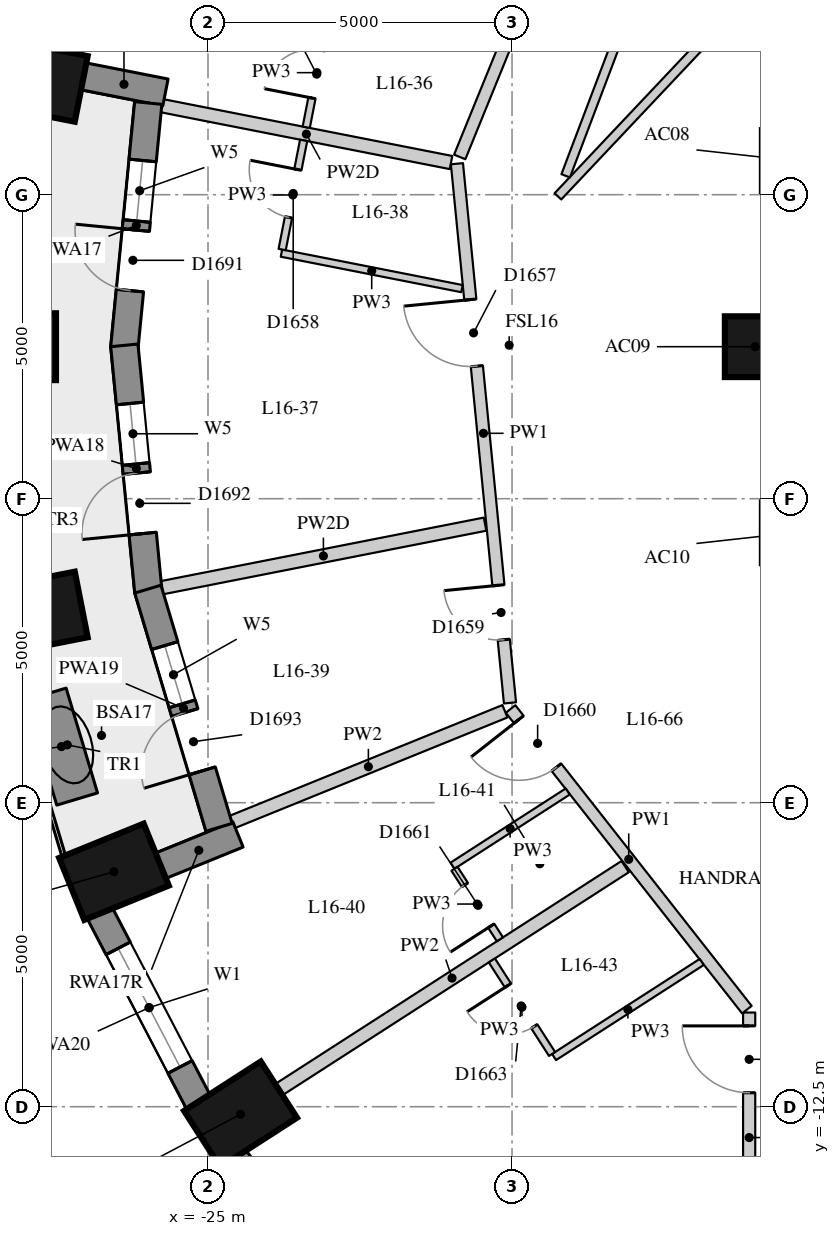
"""IFC4 building model, lengths in metres.
Left out: names, types, materials, properties, quantities, classifications, styles, units other than length and angle.
Written with IfcOpenShell. Run it as: python <this file> out.ifc"""

import sys

from ifc_helpers import new_model, si_unit, direction, frame, frame_2d, origin, origin_2d, place, context, subcontext, project, spatial, rectangle, extrude, element, fill, save


model = new_model("IFC4")
c1 = context("Model", 3, precision=1e-05, world=origin(), true_north=direction((0.0, 1.0)))
c2 = subcontext(c1, "Body", "Model", "MODEL_VIEW")
j1 = project(units=[si_unit("LENGTHUNIT", "METRE"), si_unit("PLANEANGLEUNIT", "RADIAN")], contexts=[c1])
p1 = place(None, origin())
s1 = spatial("IfcSite", under=j1, at=p1, CompositionType="ELEMENT")
p2 = place(p1, origin())
s2 = spatial("IfcBuilding", under=s1, at=p2, CompositionType="ELEMENT")
p3 = place(p2, frame((0.0, 0.0, 61.3)))
s3 = spatial("IfcBuildingStorey", under=s2, at=p3, CompositionType="ELEMENT", Elevation=61.3)
for number, where, z_axis, x_axis in (
    (1, (-27.821, 4.385, 0.0), (0.0, 0.0, 1.0), (-0.981, 0.193, 0.0)),
    (2, (-28.25, 0.0, 0.0), (0.0, 0.0, 1.0), (-1.0, 0.0, 0.0)),
    (3, (-27.821, -4.385, 0.0), (0.0, 0.0, 1.0), (-0.981, -0.193, 0.0)),
    (4, (-26.546, -8.636, 0.0), (0.0, 0.0, 1.0), (-0.927, -0.376, 0.0)),
    (5, (-24.465, -12.625, 0.0), (0.0, 0.0, 1.0), (-0.841, -0.541, 0.0)),
):
    element("IfcColumn", number, at=place(p3, frame(where, z_axis=z_axis, x_axis=x_axis)), inside=s3, PredefinedType="COLUMN", context=c2, shape_type="SweptSolid", body=[
        extrude(rectangle(XDim=1.5, YDim=1.1, at=origin_2d()), origin(), (0.0, 0.0, 1.0), 3.3),
    ])
p4 = place(p3, frame((-16.0, 0.0, 0.0), z_axis=(0.0, 0.0, 1.0), x_axis=(1.0, 0.0, 0.0)))
e6 = element("IfcColumn", 6, at=p4, inside=s3, PredefinedType="COLUMN", context=c2, shape_type="SweptSolid", body=[
    extrude(rectangle(XDim=1.0, YDim=1.0, at=origin_2d()), origin(), (0.0, 0.0, 1.0), 3.3),
])
p5 = place(p3, frame((-26.786, -9.305, 0.0), z_axis=(0.0, 0.0, 1.0), x_axis=(0.462492775226, -0.886623050041, 0.0)))
e7 = element("IfcWall", 7, at=p5, inside=s3, PredefinedType="SOLIDWALL", context=c2, shape_type="SweptSolid", body=[
    extrude(rectangle(XDim=3.532, YDim=0.45, at=frame_2d((1.766, 0.0))), origin(), (0.0, 0.0, 1.0), 3.02),
])
p6 = place(p5, frame((0.666, 0.0, 0.4)))
e8 = element("IfcOpeningElement", 8, at=p6, cuts=e7, PredefinedType="OPENING", context=c2, shape_type="SweptSolid", body=[
    extrude(rectangle(XDim=2.2, YDim=1.75, at=frame_2d((1.1, 0.875))), frame((0.0, 0.235, 0.0), z_axis=(0.0, -1.0, 0.0), x_axis=(1.0, 0.0, 0.0)), (0.0, 0.0, 1.0), 0.47),
])
p7 = place(p3, frame((-24.578, -13.328, 0.0), z_axis=(0.0, 0.0, 1.0), x_axis=(0.616661975264, -0.787228053529, 0.0)))
e9 = element("IfcWall", 9, at=p7, inside=s3, PredefinedType="SOLIDWALL", context=c2, shape_type="SweptSolid", body=[
    extrude(rectangle(XDim=3.61, YDim=0.45, at=frame_2d((1.805, 0.0))), origin(), (0.0, 0.0, 1.0), 3.02),
])
p8 = place(p7, frame((0.705, 0.0, 0.4)))
e10 = element("IfcOpeningElement", 10, at=p8, cuts=e9, PredefinedType="OPENING", context=c2, shape_type="SweptSolid", body=[
    extrude(rectangle(XDim=2.2, YDim=1.75, at=frame_2d((1.1, 0.875))), frame((0.0, 0.235, 0.0), z_axis=(0.0, -1.0, 0.0), x_axis=(1.0, 0.0, 0.0)), (0.0, 0.0, 1.0), 0.47),
])
p9 = place(p3, frame((-27.064, 4.45, 0.0), z_axis=(0.0, 0.0, 1.0), x_axis=(0.98123042829, -0.192838913596, 0.0)))
e11 = element("IfcWall", 11, at=p9, inside=s3, PredefinedType="SOLIDWALL", context=c2, shape_type="SweptSolid", body=[
    extrude(rectangle(XDim=1.39, YDim=0.45, at=frame_2d((0.695, 0.0))), origin(), (0.0, 0.0, 1.0), 2.47),
])
p10 = place(p3, frame((-25.796, -8.544, 0.0), z_axis=(0.0, 0.0, 1.0), x_axis=(0.926575599743, 0.376108572039, 0.0)))
e12 = element("IfcWall", 12, at=p10, inside=s3, PredefinedType="SOLIDWALL", context=c2, shape_type="SweptSolid", body=[
    extrude(rectangle(XDim=1.39, YDim=0.45, at=frame_2d((0.695, 0.0))), origin(), (0.0, 0.0, 1.0), 3.02),
])
p11 = place(p3, frame((-25.983, 4.008, 0.0), z_axis=(0.0, 0.0, 1.0), x_axis=(-0.097133468736, -0.995271364629, 0.0)))
e13 = element("IfcWall", 13, at=p11, inside=s3, PredefinedType="SOLIDWALL", context=c2, shape_type="SweptSolid", body=[
    extrude(rectangle(XDim=4.049, YDim=0.45, at=frame_2d((2.024, 0.0))), origin(), (0.0, 0.0, 1.0), 3.02),
])
p12 = place(p11, frame((0.949, 0.0, 0.4)))
e14 = element("IfcOpeningElement", 14, at=p12, cuts=e13, PredefinedType="OPENING", context=c2, shape_type="SweptSolid", body=[
    extrude(rectangle(XDim=1.0, YDim=1.75, at=frame_2d((0.5, 0.875))), frame((0.0, 0.235, 0.0), z_axis=(0.0, -1.0, 0.0), x_axis=(1.0, 0.0, 0.0)), (0.0, 0.0, 1.0), 0.47),
])
p13 = place(p11, frame((2.1, 0.0, 0.0)))
e15 = element("IfcOpeningElement", 15, at=p13, cuts=e13, PredefinedType="OPENING", context=c2, shape_type="SweptSolid", body=[
    extrude(rectangle(XDim=1.0, YDim=2.15, at=frame_2d((0.5, 1.075))), frame((0.0, 0.235, 0.0), z_axis=(0.0, -1.0, 0.0), x_axis=(1.0, 0.0, 0.0)), (0.0, 0.0, 1.0), 0.47),
])
p14 = place(p3, frame((-26.376, 0.022, 0.0), z_axis=(0.0, 0.0, 1.0), x_axis=(0.097092719726, -0.995275340685, 0.0)))
e16 = element("IfcWall", 16, at=p14, inside=s3, PredefinedType="SOLIDWALL", context=c2, shape_type="SweptSolid", body=[
    extrude(rectangle(XDim=4.071, YDim=0.45, at=frame_2d((2.036, 0.0))), origin(), (0.0, 0.0, 1.0), 3.02),
])
p15 = place(p14, frame((0.96, 0.0, 0.4)))
e17 = element("IfcOpeningElement", 17, at=p15, cuts=e16, PredefinedType="OPENING", context=c2, shape_type="SweptSolid", body=[
    extrude(rectangle(XDim=1.0, YDim=1.75, at=frame_2d((0.5, 0.875))), frame((0.0, 0.235, 0.0), z_axis=(0.0, -1.0, 0.0), x_axis=(1.0, 0.0, 0.0)), (0.0, 0.0, 1.0), 0.47),
])
p16 = place(p14, frame((2.111, 0.0, 0.0)))
e18 = element("IfcOpeningElement", 18, at=p16, cuts=e16, PredefinedType="OPENING", context=c2, shape_type="SweptSolid", body=[
    extrude(rectangle(XDim=1.0, YDim=2.15, at=frame_2d((0.5, 1.075))), frame((0.0, 0.235, 0.0), z_axis=(0.0, -1.0, 0.0), x_axis=(1.0, 0.0, 0.0)), (0.0, 0.0, 1.0), 0.47),
])
p17 = place(p3, frame((-25.989, -3.987, 0.0), z_axis=(0.0, 0.0, 1.0), x_axis=(0.286427456555, -0.958101932015, 0.0)))
e19 = element("IfcWall", 19, at=p17, inside=s3, PredefinedType="SOLIDWALL", context=c2, shape_type="SweptSolid", body=[
    extrude(rectangle(XDim=4.089, YDim=0.45, at=frame_2d((2.044, 0.0))), origin(), (0.0, 0.0, 1.0), 3.02),
])
p18 = place(p17, frame((0.969, 0.0, 0.4)))
e20 = element("IfcOpeningElement", 20, at=p18, cuts=e19, PredefinedType="OPENING", context=c2, shape_type="SweptSolid", body=[
    extrude(rectangle(XDim=1.0, YDim=1.75, at=frame_2d((0.5, 0.875))), frame((0.0, 0.235, 0.0), z_axis=(0.0, -1.0, 0.0), x_axis=(1.0, 0.0, 0.0)), (0.0, 0.0, 1.0), 0.47),
])
p19 = place(p17, frame((2.119, 0.0, 0.0)))
e21 = element("IfcOpeningElement", 21, at=p19, cuts=e19, PredefinedType="OPENING", context=c2, shape_type="SweptSolid", body=[
    extrude(rectangle(XDim=1.0, YDim=2.15, at=frame_2d((0.5, 1.075))), frame((0.0, 0.235, 0.0), z_axis=(0.0, -1.0, 0.0), x_axis=(1.0, 0.0, 0.0)), (0.0, 0.0, 1.0), 0.47),
])
p20 = place(p3, frame((-27.669, -5.715, 0.0), z_axis=(0.0, 0.0, 1.0), x_axis=(0.287024312863, -0.957923297465, 0.0)))
e22 = element("IfcWall", 22, at=p20, inside=s3, PredefinedType="USERDEFINED", context=c2, shape_type="SweptSolid", body=[
    extrude(rectangle(XDim=1.8, YDim=0.7, at=frame_2d((0.9, 0.0))), origin(), (0.0, 0.0, 1.0), 0.75),
])
p21 = place(p3, frame((-16.1, -15.064, 0.0), z_axis=(0.0, 0.0, 1.0), x_axis=(0.0, 1.0, 0.0)))
e23 = element("IfcWall", 23, at=p21, inside=s3, PredefinedType="PARTITIONING", context=c2, shape_type="SweptSolid", body=[
    extrude(rectangle(XDim=4.113, YDim=0.2, at=frame_2d((2.057, 0.0))), origin(), (0.0, 0.0, 1.0), 3.02),
])
p22 = place(p21, frame((2.793, 0.0, 0.0)))
e24 = element("IfcOpeningElement", 24, at=p22, cuts=e23, PredefinedType="OPENING", context=c2, shape_type="SweptSolid", body=[
    extrude(rectangle(XDim=1.1, YDim=2.1, at=frame_2d((0.55, 1.05))), frame((0.0, 0.11, 0.0), z_axis=(0.0, -1.0, 0.0), x_axis=(1.0, 0.0, 0.0)), (0.0, 0.0, 1.0), 0.22),
])
p23 = place(p3, frame((-16.137, -10.904, 0.0), z_axis=(0.0, 0.0, 1.0), x_axis=(-0.617888403737, 0.786265807808, 0.0)))
e25 = element("IfcWall", 25, at=p23, inside=s3, PredefinedType="PARTITIONING", context=c2, shape_type="SweptSolid", body=[
    extrude(rectangle(XDim=6.29, YDim=0.2, at=frame_2d((3.145, 0.0))), origin(), (0.0, 0.0, 1.0), 3.02),
])
p24 = place(p23, frame((5.07, 0.0, 0.0)))
e26 = element("IfcOpeningElement", 26, at=p24, cuts=e25, PredefinedType="OPENING", context=c2, shape_type="SweptSolid", body=[
    extrude(rectangle(XDim=1.0, YDim=2.1, at=frame_2d((0.5, 1.05))), frame((0.0, 0.11, 0.0), z_axis=(0.0, -1.0, 0.0), x_axis=(1.0, 0.0, 0.0)), (0.0, 0.0, 1.0), 0.22),
])
p25 = place(p3, frame((-20.034, -5.858, 0.0), z_axis=(0.0, 0.0, 1.0), x_axis=(-0.097894942705, 0.995196754513, 0.0)))
e27 = element("IfcWall", 27, at=p25, inside=s3, PredefinedType="PARTITIONING", context=c2, shape_type="SweptSolid", body=[
    extrude(rectangle(XDim=8.911, YDim=0.2, at=frame_2d((4.455, 0.0))), origin(), (0.0, 0.0, 1.0), 3.02),
])
p26 = place(p25, frame((5.565, 0.0, 0.0)))
e28 = element("IfcOpeningElement", 28, at=p26, cuts=e27, PredefinedType="OPENING", context=c2, shape_type="SweptSolid", body=[
    extrude(rectangle(XDim=1.1, YDim=2.1, at=frame_2d((0.55, 1.05))), frame((0.0, 0.11, 0.0), z_axis=(0.0, -1.0, 0.0), x_axis=(1.0, 0.0, 0.0)), (0.0, 0.0, 1.0), 0.22),
])
p27 = place(p25, frame((1.044, 0.0, 0.0)))
e29 = element("IfcOpeningElement", 29, at=p27, cuts=e27, PredefinedType="OPENING", context=c2, shape_type="SweptSolid", body=[
    extrude(rectangle(XDim=0.9, YDim=2.1, at=frame_2d((0.45, 1.05))), frame((0.0, 0.11, 0.0), z_axis=(0.0, -1.0, 0.0), x_axis=(1.0, 0.0, 0.0)), (0.0, 0.0, 1.0), 0.22),
])
p28 = place(p3, frame((-20.861, 3.121, 0.0), z_axis=(0.0, 0.0, 1.0), x_axis=(0.377214346955, 0.926125983034, 0.0)))
e30 = element("IfcWall", 30, at=p28, inside=s3, PredefinedType="PARTITIONING", context=c2, shape_type="SweptSolid", body=[
    extrude(rectangle(XDim=6.107, YDim=0.2, at=frame_2d((3.054, 0.0))), origin(), (0.0, 0.0, 1.0), 3.02),
])
p29 = place(p28, frame((2.285, 0.0, 0.0)))
e31 = element("IfcOpeningElement", 31, at=p29, cuts=e30, PredefinedType="OPENING", context=c2, shape_type="SweptSolid", body=[
    extrude(rectangle(XDim=1.1, YDim=2.1, at=frame_2d((0.55, 1.05))), frame((0.0, 0.11, 0.0), z_axis=(0.0, -1.0, 0.0), x_axis=(1.0, 0.0, 0.0)), (0.0, 0.0, 1.0), 0.22),
])
p30 = place(p3, frame((-14.499, 7.501, 0.0), z_axis=(0.0, 0.0, 1.0), x_axis=(-0.686403699782, -0.727220709913, 0.0)))
e32 = element("IfcWall", 32, at=p30, inside=s3, PredefinedType="PARTITIONING", context=c2, shape_type="SweptSolid", body=[
    extrude(rectangle(XDim=6.915, YDim=0.15, at=frame_2d((3.457, 0.0))), origin(), (0.0, 0.0, 1.0), 3.02),
])
p31 = place(p3, frame((-19.118, 2.811, 0.0), z_axis=(0.0, 0.0, 1.0), x_axis=(0.35451573991, 0.935050046872, 0.0)))
e33 = element("IfcWall", 33, at=p31, inside=s3, PredefinedType="PARTITIONING", context=c2, shape_type="SweptSolid", body=[
    extrude(rectangle(XDim=5.367, YDim=0.15, at=frame_2d((2.684, 0.0))), origin(), (0.0, 0.0, 1.0), 3.02),
])
p32 = place(p3, frame((-25.761, 3.964, 0.0), z_axis=(0.0, 0.0, 1.0), x_axis=(0.981216494224, -0.192909801364, 0.0)))
e34 = element("IfcWall", 34, at=p32, inside=s3, PredefinedType="PARTITIONING", context=c2, shape_type="SweptSolid", body=[
    extrude(rectangle(XDim=4.848, YDim=0.22, at=frame_2d((2.424, 0.0))), origin(), (0.0, 0.0, 1.0), 2.47),
])
p33 = place(p3, frame((-25.761, -3.964, 0.0), z_axis=(0.0, 0.0, 1.0), x_axis=(0.981209698951, 0.192944361627, 0.0)))
e35 = element("IfcWall", 35, at=p33, inside=s3, PredefinedType="PARTITIONING", context=c2, shape_type="SweptSolid", body=[
    extrude(rectangle(XDim=5.419, YDim=0.22, at=frame_2d((2.71, 0.0))), origin(), (0.0, 0.0, 1.0), 2.47),
])
p34 = place(p3, frame((-24.608, -7.82, 0.0), z_axis=(0.0, 0.0, 1.0), x_axis=(0.92655764882, 0.376152792643, 0.0)))
e36 = element("IfcWall", 36, at=p34, inside=s3, PredefinedType="PARTITIONING", context=c2, shape_type="SweptSolid", body=[
    extrude(rectangle(XDim=4.848, YDim=0.22, at=frame_2d((2.424, 0.0))), origin(), (0.0, 0.0, 1.0), 3.02),
])
p35 = place(p3, frame((-23.835, -12.219, 0.0), z_axis=(0.0, 0.0, 1.0), x_axis=(0.840749666863, 0.541424046076, 0.0)))
e37 = element("IfcWall", 37, at=p35, inside=s3, PredefinedType="PARTITIONING", context=c2, shape_type="SweptSolid", body=[
    extrude(rectangle(XDim=6.775, YDim=0.22, at=frame_2d((3.387, 0.0))), origin(), (0.0, 0.0, 1.0), 3.02),
])
p36 = place(p3, frame((-20.823, 0.955, 0.0), z_axis=(0.0, 0.0, 1.0), x_axis=(-0.981208735185, 0.192949262754, 0.0)))
e38 = element("IfcWall", 38, at=p36, inside=s3, PredefinedType="PARTITIONING", context=c2, shape_type="SweptSolid", body=[
    extrude(rectangle(XDim=3.025, YDim=0.12, at=frame_2d((1.513, 0.0))), origin(), (0.0, 0.0, 1.0), 3.02),
])
p37 = place(p3, frame((-19.084, -7.316, 0.0), z_axis=(0.0, 0.0, 1.0), x_axis=(-0.840762836723, -0.54140359473, 0.0)))
e39 = element("IfcWall", 39, at=p37, inside=s3, PredefinedType="PARTITIONING", context=c2, shape_type="SweptSolid", body=[
    extrude(rectangle(XDim=2.253, YDim=0.12, at=frame_2d((1.127, 0.0))), origin(), (0.0, 0.0, 1.0), 3.02),
])
p38 = place(p3, frame((-16.881, -10.12, 0.0), z_axis=(0.0, 0.0, 1.0), x_axis=(-0.840749755927, -0.541423907773, 0.0)))
e40 = element("IfcWall", 40, at=p38, inside=s3, PredefinedType="PARTITIONING", context=c2, shape_type="SweptSolid", body=[
    extrude(rectangle(XDim=2.888, YDim=0.12, at=frame_2d((1.444, 0.0))), origin(), (0.0, 0.0, 1.0), 3.02),
])
p39 = place(p3, frame((-23.032, 5.405, 0.0), z_axis=(0.0, 0.0, 1.0), x_axis=(-0.19288291118, -0.981221780524, 0.0)))
e41 = element("IfcWall", 41, at=p39, inside=s3, PredefinedType="PARTITIONING", context=c2, shape_type="SweptSolid", body=[
    extrude(rectangle(XDim=1.83, YDim=0.12, at=frame_2d((0.915, 0.0))), origin(), (0.0, 0.0, 1.0), 3.02),
])
p40 = place(p39, frame((0.54, 0.0, 0.0)))
e42 = element("IfcOpeningElement", 42, at=p40, cuts=e41, PredefinedType="OPENING", context=c2, shape_type="SweptSolid", body=[
    extrude(rectangle(XDim=0.8, YDim=2.1, at=frame_2d((0.4, 1.05))), frame((0.0, 0.07, 0.0), z_axis=(0.0, -1.0, 0.0), x_axis=(1.0, 0.0, 0.0)), (0.0, 0.0, 1.0), 0.14),
])
p41 = place(p3, frame((-23.781, 1.598, 0.0), z_axis=(0.0, 0.0, 1.0), x_axis=(0.193036598643, 0.981191557029, 0.0)))
e43 = element("IfcWall", 43, at=p41, inside=s3, PredefinedType="PARTITIONING", context=c2, shape_type="SweptSolid", body=[
    extrude(rectangle(XDim=1.83, YDim=0.12, at=frame_2d((0.915, 0.0))), origin(), (0.0, 0.0, 1.0), 3.02),
])
p42 = place(p41, frame((0.54, 0.0, 0.0)))
e44 = element("IfcOpeningElement", 44, at=p42, cuts=e43, PredefinedType="OPENING", context=c2, shape_type="SweptSolid", body=[
    extrude(rectangle(XDim=0.8, YDim=2.1, at=frame_2d((0.4, 1.05))), frame((0.0, 0.07, 0.0), z_axis=(0.0, -1.0, 0.0), x_axis=(1.0, 0.0, 0.0)), (0.0, 0.0, 1.0), 0.14),
])
p43 = place(p3, frame((-20.946, -8.587, 0.0), z_axis=(0.0, 0.0, 1.0), x_axis=(0.541526323973, -0.840683793375, 0.0)))
e45 = element("IfcWall", 45, at=p43, inside=s3, PredefinedType="PARTITIONING", context=c2, shape_type="SweptSolid", body=[
    extrude(rectangle(XDim=1.38, YDim=0.12, at=frame_2d((0.69, 0.0))), origin(), (0.0, 0.0, 1.0), 3.02),
])
p44 = place(p43, frame((0.315, 0.0, 0.0)))
e46 = element("IfcOpeningElement", 46, at=p44, cuts=e45, PredefinedType="OPENING", context=c2, shape_type="SweptSolid", body=[
    extrude(rectangle(XDim=0.8, YDim=2.1, at=frame_2d((0.4, 1.05))), frame((0.0, 0.07, 0.0), z_axis=(0.0, -1.0, 0.0), x_axis=(1.0, 0.0, 0.0)), (0.0, 0.0, 1.0), 0.14),
])
p45 = place(p3, frame((-19.341, -11.633, 0.0), z_axis=(0.0, 0.0, 1.0), x_axis=(-0.541391271501, 0.840770772055, 0.0)))
e47 = element("IfcWall", 47, at=p45, inside=s3, PredefinedType="PARTITIONING", context=c2, shape_type="SweptSolid", body=[
    extrude(rectangle(XDim=1.83, YDim=0.12, at=frame_2d((0.915, 0.0))), origin(), (0.0, 0.0, 1.0), 3.02),
])
p46 = place(p45, frame((0.54, 0.0, 0.0)))
e48 = element("IfcOpeningElement", 48, at=p46, cuts=e47, PredefinedType="OPENING", context=c2, shape_type="SweptSolid", body=[
    extrude(rectangle(XDim=0.8, YDim=2.1, at=frame_2d((0.4, 1.05))), frame((0.0, 0.07, 0.0), z_axis=(0.0, -1.0, 0.0), x_axis=(1.0, 0.0, 0.0)), (0.0, 0.0, 1.0), 0.14),
])
p47 = place(p6, origin())
e49 = element("IfcWindow", 49, at=p47, inside=s3, PartitioningType="SINGLE_PANEL", PredefinedType="WINDOW", context=c2, shape_type="SweptSolid", body=[
    extrude(rectangle(XDim=2.2, YDim=1.75, at=frame_2d((1.1, 0.875))), frame((0.0, 0.035, 0.0), z_axis=(0.0, -1.0, 0.0), x_axis=(1.0, 0.0, 0.0)), (0.0, 0.0, 1.0), 0.06),
])
fill(e8, e49)
p48 = place(p12, origin())
e50 = element("IfcWindow", 50, at=p48, inside=s3, PartitioningType="SINGLE_PANEL", PredefinedType="WINDOW", context=c2, shape_type="SweptSolid", body=[
    extrude(rectangle(XDim=1.0, YDim=1.75, at=frame_2d((0.5, 0.875))), frame((0.0, 0.035, 0.0), z_axis=(0.0, -1.0, 0.0), x_axis=(1.0, 0.0, 0.0)), (0.0, 0.0, 1.0), 0.06),
])
fill(e14, e50)
p49 = place(p13, frame((1.0, 0.0, 0.0), z_axis=(0.0, 0.0, 1.0), x_axis=(-1.0, 0.0, 0.0)))
e51 = element("IfcDoor", 51, at=p49, inside=s3, OperationType="SINGLE_SWING_RIGHT", PredefinedType="DOOR", context=c2, shape_type="SweptSolid", body=[
    extrude(rectangle(XDim=1.0, YDim=2.15, at=frame_2d((0.5, 1.075))), frame((0.0, 0.075, 0.0), z_axis=(0.0, -1.0, 0.0), x_axis=(1.0, 0.0, 0.0)), (0.0, 0.0, 1.0), 0.05),
])
fill(e15, e51)
p50 = place(p15, origin())
e52 = element("IfcWindow", 52, at=p50, inside=s3, PartitioningType="SINGLE_PANEL", PredefinedType="WINDOW", context=c2, shape_type="SweptSolid", body=[
    extrude(rectangle(XDim=1.0, YDim=1.75, at=frame_2d((0.5, 0.875))), frame((0.0, 0.035, 0.0), z_axis=(0.0, -1.0, 0.0), x_axis=(1.0, 0.0, 0.0)), (0.0, 0.0, 1.0), 0.06),
])
fill(e17, e52)
p51 = place(p16, frame((1.0, 0.0, 0.0), z_axis=(0.0, 0.0, 1.0), x_axis=(-1.0, 0.0, 0.0)))
e53 = element("IfcDoor", 53, at=p51, inside=s3, OperationType="SINGLE_SWING_LEFT", PredefinedType="DOOR", context=c2, shape_type="SweptSolid", body=[
    extrude(rectangle(XDim=1.0, YDim=2.15, at=frame_2d((0.5, 1.075))), frame((0.0, 0.075, 0.0), z_axis=(0.0, -1.0, 0.0), x_axis=(1.0, 0.0, 0.0)), (0.0, 0.0, 1.0), 0.05),
])
fill(e18, e53)
p52 = place(p18, origin())
e54 = element("IfcWindow", 54, at=p52, inside=s3, PartitioningType="SINGLE_PANEL", PredefinedType="WINDOW", context=c2, shape_type="SweptSolid", body=[
    extrude(rectangle(XDim=1.0, YDim=1.75, at=frame_2d((0.5, 0.875))), frame((0.0, 0.035, 0.0), z_axis=(0.0, -1.0, 0.0), x_axis=(1.0, 0.0, 0.0)), (0.0, 0.0, 1.0), 0.06),
])
fill(e20, e54)
p53 = place(p19, frame((1.0, 0.0, 0.0), z_axis=(0.0, 0.0, 1.0), x_axis=(-1.0, 0.0, 0.0)))
e55 = element("IfcDoor", 55, at=p53, inside=s3, OperationType="SINGLE_SWING_LEFT", PredefinedType="DOOR", context=c2, shape_type="SweptSolid", body=[
    extrude(rectangle(XDim=1.0, YDim=2.15, at=frame_2d((0.5, 1.075))), frame((0.0, 0.075, 0.0), z_axis=(0.0, -1.0, 0.0), x_axis=(1.0, 0.0, 0.0)), (0.0, 0.0, 1.0), 0.05),
])
fill(e21, e55)
p54 = place(p40, origin())
e56 = element("IfcDoor", 56, at=p54, inside=s3, OperationType="SINGLE_SWING_LEFT", PredefinedType="DOOR", context=c2, shape_type="SweptSolid", body=[
    extrude(rectangle(XDim=0.8, YDim=2.1, at=frame_2d((0.4, 1.05))), frame((0.0, 0.025, 0.0), z_axis=(0.0, -1.0, 0.0), x_axis=(1.0, 0.0, 0.0)), (0.0, 0.0, 1.0), 0.05),
])
fill(e42, e56)
p55 = place(p26, origin())
e57 = element("IfcDoor", 57, at=p55, inside=s3, OperationType="SINGLE_SWING_RIGHT", PredefinedType="DOOR", context=c2, shape_type="SweptSolid", body=[
    extrude(rectangle(XDim=1.1, YDim=2.1, at=frame_2d((0.55, 1.05))), frame((0.0, 0.025, 0.0), z_axis=(0.0, -1.0, 0.0), x_axis=(1.0, 0.0, 0.0)), (0.0, 0.0, 1.0), 0.05),
])
fill(e28, e57)
p56 = place(p42, origin())
e58 = element("IfcDoor", 58, at=p56, inside=s3, OperationType="SINGLE_SWING_RIGHT", PredefinedType="DOOR", context=c2, shape_type="SweptSolid", body=[
    extrude(rectangle(XDim=0.8, YDim=2.1, at=frame_2d((0.4, 1.05))), frame((0.0, 0.025, 0.0), z_axis=(0.0, -1.0, 0.0), x_axis=(1.0, 0.0, 0.0)), (0.0, 0.0, 1.0), 0.05),
])
fill(e44, e58)
p57 = place(p27, origin())
e59 = element("IfcDoor", 59, at=p57, inside=s3, OperationType="SINGLE_SWING_RIGHT", PredefinedType="DOOR", context=c2, shape_type="SweptSolid", body=[
    extrude(rectangle(XDim=0.9, YDim=2.1, at=frame_2d((0.45, 1.05))), frame((0.0, 0.025, 0.0), z_axis=(0.0, -1.0, 0.0), x_axis=(1.0, 0.0, 0.0)), (0.0, 0.0, 1.0), 0.05),
])
fill(e29, e59)
p58 = place(p24, origin())
e60 = element("IfcDoor", 60, at=p58, inside=s3, OperationType="SINGLE_SWING_RIGHT", PredefinedType="DOOR", context=c2, shape_type="SweptSolid", body=[
    extrude(rectangle(XDim=1.0, YDim=2.1, at=frame_2d((0.5, 1.05))), frame((0.0, 0.025, 0.0), z_axis=(0.0, -1.0, 0.0), x_axis=(1.0, 0.0, 0.0)), (0.0, 0.0, 1.0), 0.05),
])
fill(e26, e60)
p59 = place(p44, origin())
e61 = element("IfcDoor", 61, at=p59, inside=s3, OperationType="SINGLE_SWING_LEFT", PredefinedType="DOOR", context=c2, shape_type="SweptSolid", body=[
    extrude(rectangle(XDim=0.8, YDim=2.1, at=frame_2d((0.4, 1.05))), frame((0.0, 0.025, 0.0), z_axis=(0.0, -1.0, 0.0), x_axis=(1.0, 0.0, 0.0)), (0.0, 0.0, 1.0), 0.05),
])
fill(e46, e61)
p60 = place(p22, origin())
e62 = element("IfcDoor", 62, at=p60, inside=s3, OperationType="SINGLE_SWING_RIGHT", PredefinedType="DOOR", context=c2, shape_type="SweptSolid", body=[
    extrude(rectangle(XDim=1.1, YDim=2.1, at=frame_2d((0.55, 1.05))), frame((0.0, 0.025, 0.0), z_axis=(0.0, -1.0, 0.0), x_axis=(1.0, 0.0, 0.0)), (0.0, 0.0, 1.0), 0.05),
])
fill(e24, e62)
p61 = place(p46, origin())
e63 = element("IfcDoor", 63, at=p61, inside=s3, OperationType="SINGLE_SWING_RIGHT", PredefinedType="DOOR", context=c2, shape_type="SweptSolid", body=[
    extrude(rectangle(XDim=0.8, YDim=2.1, at=frame_2d((0.4, 1.05))), frame((0.0, 0.025, 0.0), z_axis=(0.0, -1.0, 0.0), x_axis=(1.0, 0.0, 0.0)), (0.0, 0.0, 1.0), 0.05),
])
fill(e48, e63)
save(model, sys.argv[1])
